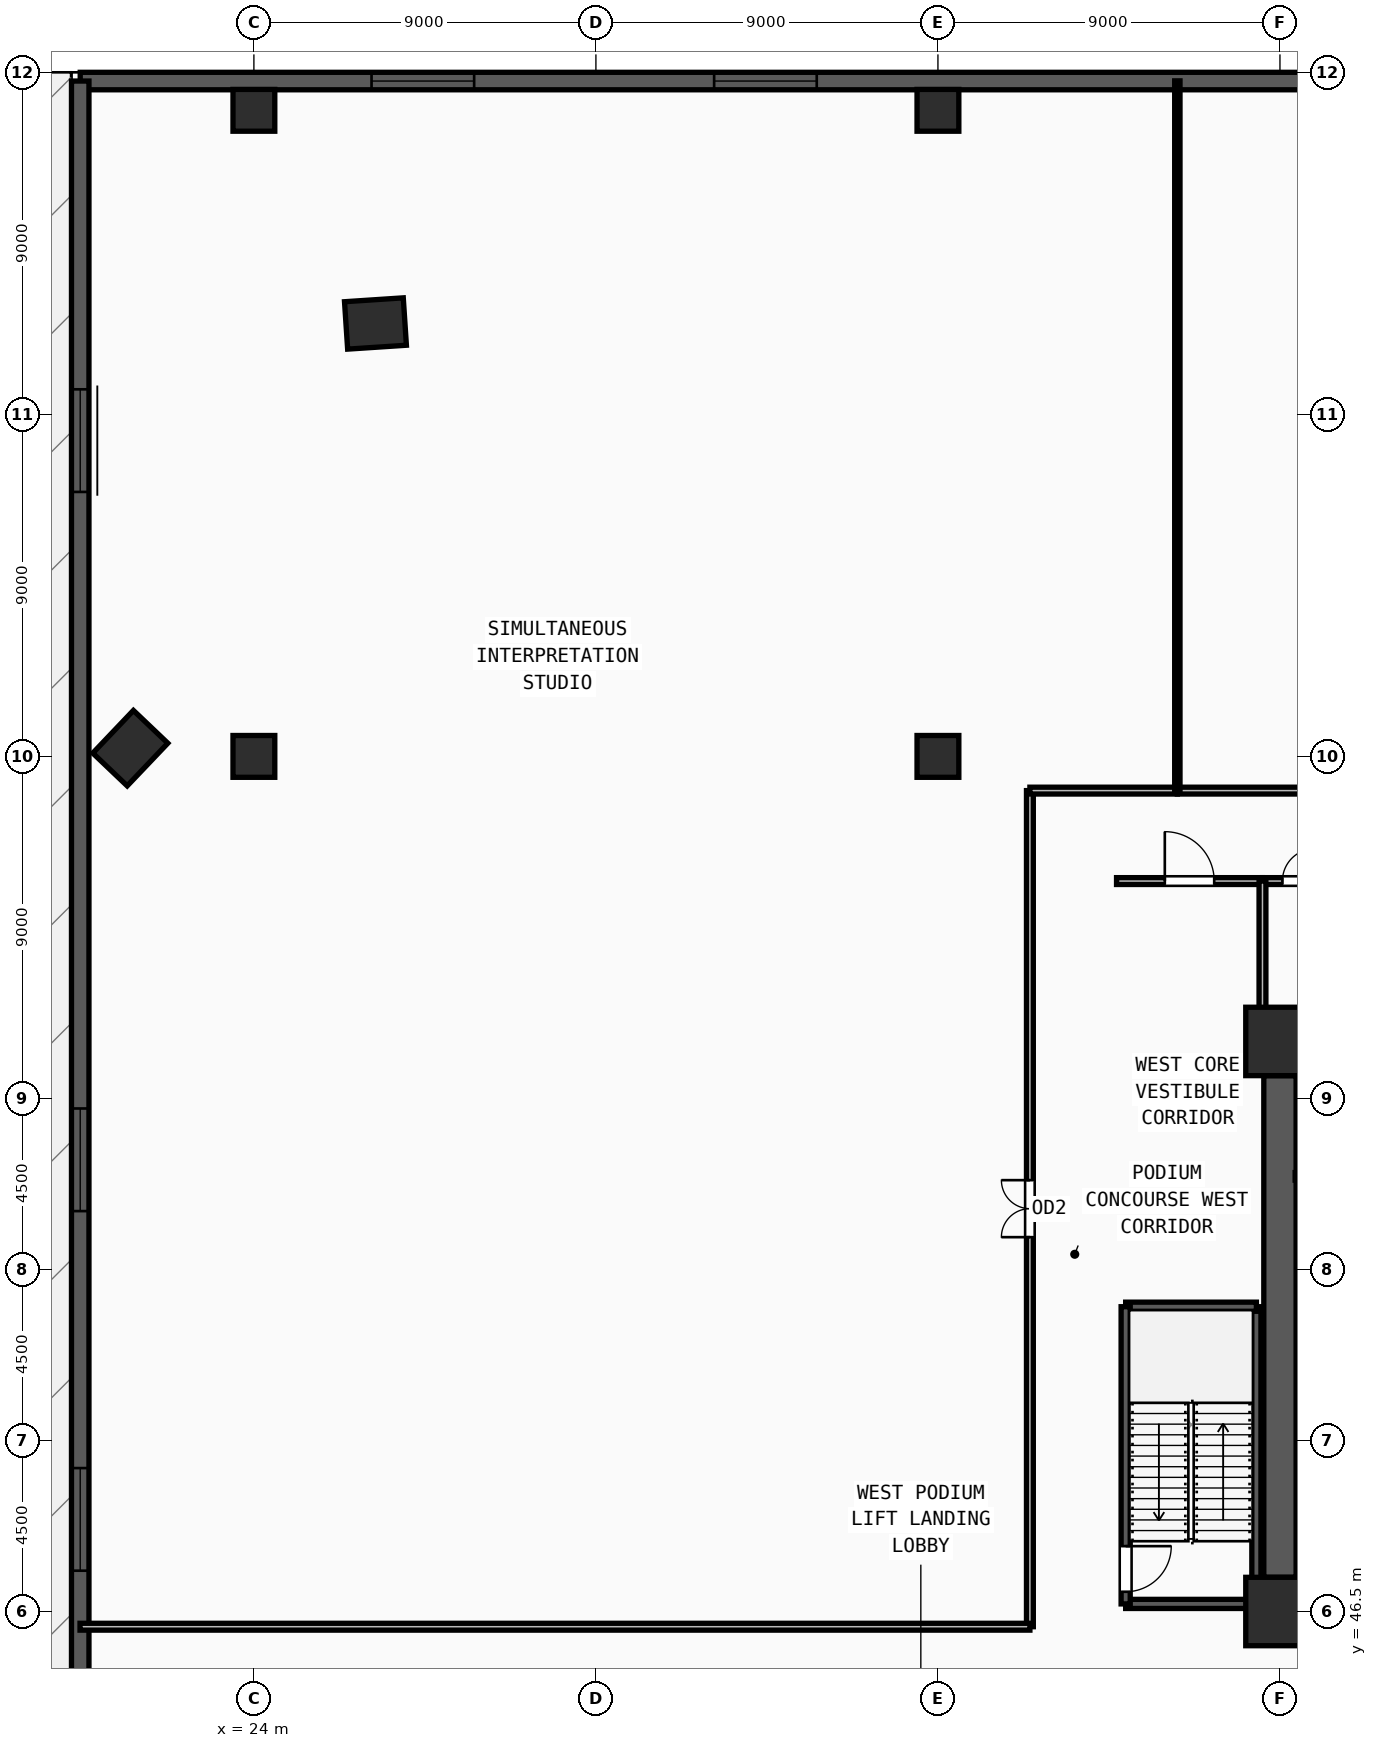
"""IFC4 building model, lengths in metres.
Left out: names, types, materials, properties, quantities, classifications, styles, units other than length and angle.
Written with IfcOpenShell. Run it as: python <this file> out.ifc"""

import sys

from ifc_helpers import new_model, si_unit, direction, frame, frame_2d, origin, origin_2d, place, context, subcontext, project, spatial, rectangle, extrude, source, transform, mapped, element, fill, save


model = new_model("IFC4")
c1 = context("Model", 3, precision=1e-05, world=origin(), true_north=direction((0.0, 1.0)))
c2 = subcontext(c1, "Body", "Model", "MODEL_VIEW")
j1 = project(units=[si_unit("LENGTHUNIT", "METRE"), si_unit("PLANEANGLEUNIT", "RADIAN")], contexts=[c1])
p1 = place(None, origin())
s1 = spatial("IfcSite", under=j1, at=p1, CompositionType="ELEMENT")
p2 = place(p1, origin())
s2 = spatial("IfcBuilding", under=s1, at=p2, CompositionType="ELEMENT")
p3 = place(p2, frame((0.0, 0.0, 9.9)))
s3 = spatial("IfcBuildingStorey", under=s2, at=p3, CompositionType="ELEMENT", Elevation=9.9)
m1 = source(origin(), c2, "Body", "SweptSolid", [
    extrude(rectangle(XDim=1.8, YDim=1.8, at=origin_2d()), origin(), (0.0, 0.0, 1.0), 4.5),
])
for number, where, z_axis, x_axis in (
    (1, (51.0, 46.5, 0.0), (0.0, 0.0, 1.0), (1.0, 0.0, 0.0)),
    (2, (51.0, 61.5, 0.0), (0.0, 0.0, 1.0), (1.0, 0.0, 0.0)),
):
    element("IfcColumn", number, at=place(p3, frame(where, z_axis=z_axis, x_axis=x_axis)), inside=s3, PredefinedType="COLUMN", context=c2, shape_type="MappedRepresentation", body=[
        mapped(m1, transform((0.0, 0.0, 0.0), x_axis=(1.0, 0.0, 0.0), y_axis=(0.0, 1.0, 0.0), z_axis=(0.0, 0.0, 1.0), scale=1.0)),
    ])
m2 = source(origin(), c2, "Body", "SweptSolid", [
    extrude(rectangle(XDim=1.55, YDim=1.25, at=origin_2d()), origin(), (0.0, 0.0, 1.0), 4.5),
])
for number, where, z_axis, x_axis in (
    (3, (20.748, 69.217, 0.0), (0.0, 0.0, 1.0), (0.689, 0.724, 0.0)),
    (4, (27.199, 80.391, 0.0), (0.0, 0.0, 1.0), (0.998, 0.066, 0.0)),
):
    element("IfcColumn", number, at=place(p3, frame(where, z_axis=z_axis, x_axis=x_axis)), inside=s3, PredefinedType="COLUMN", context=c2, shape_type="MappedRepresentation", body=[
        mapped(m2, transform((0.0, 0.0, 0.0), x_axis=(1.0, 0.0, 0.0), y_axis=(0.0, 1.0, 0.0), z_axis=(0.0, 0.0, 1.0), scale=1.0)),
    ])
m3 = source(origin(), c2, "Body", "SweptSolid", [
    extrude(rectangle(XDim=1.1, YDim=1.1, at=origin_2d()), origin(), (0.0, 0.0, 1.0), 4.5),
])
for number, where, z_axis, x_axis in (
    (5, (24.0, 69.0, 0.0), (0.0, 0.0, 1.0), (1.0, 0.0, 0.0)),
    (6, (42.0, 69.0, 0.0), (0.0, 0.0, 1.0), (1.0, 0.0, 0.0)),
    (7, (24.0, 86.0, 0.0), (0.0, 0.0, 1.0), (1.0, 0.0, 0.0)),
    (8, (42.0, 86.0, 0.0), (0.0, 0.0, 1.0), (1.0, 0.0, 0.0)),
):
    element("IfcColumn", number, at=place(p3, frame(where, z_axis=z_axis, x_axis=x_axis)), inside=s3, PredefinedType="COLUMN", context=c2, shape_type="MappedRepresentation", body=[
        mapped(m3, transform((0.0, 0.0, 0.0), x_axis=(1.0, 0.0, 0.0), y_axis=(0.0, 1.0, 0.0), z_axis=(0.0, 0.0, 1.0), scale=1.0)),
    ])
p4 = place(p3, frame((100.57, 86.77, 0.0), z_axis=(0.0, 0.0, 1.0), x_axis=(-1.0, 0.0, 0.0)))
e9 = element("IfcWall", 9, at=p4, inside=s3, PredefinedType="SOLIDWALL", context=c2, shape_type="SweptSolid", body=[
    extrude(rectangle(XDim=81.14, YDim=0.46, at=frame_2d((40.57, 0.0))), origin(), (0.0, 0.0, 1.0), 4.25),
])
m4 = source(origin(), c2, "Body", "SweptSolid", [
    extrude(rectangle(XDim=2.7, YDim=2.35, at=frame_2d((1.35, 1.175))), frame((0.0, 0.24, 0.0), z_axis=(0.0, -1.0, 0.0), x_axis=(1.0, 0.0, 0.0)), (0.0, 0.0, 1.0), 0.48),
])
p5 = place(p4, frame((7.666, 0.0, 0.55)))
e10 = element("IfcOpeningElement", 10, at=p5, cuts=e9, PredefinedType="OPENING", context=c2, shape_type="MappedRepresentation", body=[
    mapped(m4, transform((0.0, 0.0, 0.0), x_axis=(1.0, 0.0, 0.0), y_axis=(0.0, 1.0, 0.0), z_axis=(0.0, 0.0, 1.0), scale=1.0)),
])
p6 = place(p4, frame((16.681, 0.0, 0.55)))
e11 = element("IfcOpeningElement", 11, at=p6, cuts=e9, PredefinedType="OPENING", context=c2, shape_type="MappedRepresentation", body=[
    mapped(m4, transform((0.0, 0.0, 0.0), x_axis=(1.0, 0.0, 0.0), y_axis=(0.0, 1.0, 0.0), z_axis=(0.0, 0.0, 1.0), scale=1.0)),
])
p7 = place(p4, frame((34.712, 0.0, 0.55)))
e12 = element("IfcOpeningElement", 12, at=p7, cuts=e9, PredefinedType="OPENING", context=c2, shape_type="MappedRepresentation", body=[
    mapped(m4, transform((0.0, 0.0, 0.0), x_axis=(1.0, 0.0, 0.0), y_axis=(0.0, 1.0, 0.0), z_axis=(0.0, 0.0, 1.0), scale=1.0)),
])
p8 = place(p4, frame((43.728, 0.0, 0.55)))
e13 = element("IfcOpeningElement", 13, at=p8, cuts=e9, PredefinedType="OPENING", context=c2, shape_type="MappedRepresentation", body=[
    mapped(m4, transform((0.0, 0.0, 0.0), x_axis=(1.0, 0.0, 0.0), y_axis=(0.0, 1.0, 0.0), z_axis=(0.0, 0.0, 1.0), scale=1.0)),
])
p9 = place(p4, frame((61.759, 0.0, 0.55)))
e14 = element("IfcOpeningElement", 14, at=p9, cuts=e9, PredefinedType="OPENING", context=c2, shape_type="MappedRepresentation", body=[
    mapped(m4, transform((0.0, 0.0, 0.0), x_axis=(1.0, 0.0, 0.0), y_axis=(0.0, 1.0, 0.0), z_axis=(0.0, 0.0, 1.0), scale=1.0)),
])
p10 = place(p4, frame((70.774, 0.0, 0.55)))
e15 = element("IfcOpeningElement", 15, at=p10, cuts=e9, PredefinedType="OPENING", context=c2, shape_type="MappedRepresentation", body=[
    mapped(m4, transform((0.0, 0.0, 0.0), x_axis=(1.0, 0.0, 0.0), y_axis=(0.0, 1.0, 0.0), z_axis=(0.0, 0.0, 1.0), scale=1.0)),
])
p11 = place(p3, frame((19.43, 86.77, 0.0), z_axis=(0.0, 0.0, 1.0), x_axis=(0.0, -1.0, 0.0)))
e16 = element("IfcWall", 16, at=p11, inside=s3, PredefinedType="SOLIDWALL", context=c2, shape_type="SweptSolid", body=[
    extrude(rectangle(XDim=66.23, YDim=0.46, at=frame_2d((33.115, 0.0))), origin(), (0.0, 0.0, 1.0), 4.25),
])
p12 = place(p11, frame((8.111, 0.0, 0.55)))
e17 = element("IfcOpeningElement", 17, at=p12, cuts=e16, PredefinedType="OPENING", context=c2, shape_type="MappedRepresentation", body=[
    mapped(m4, transform((0.0, 0.0, 0.0), x_axis=(1.0, 0.0, 0.0), y_axis=(0.0, 1.0, 0.0), z_axis=(0.0, 0.0, 1.0), scale=1.0)),
])
p13 = place(p11, frame((27.034, 0.0, 0.55)))
e18 = element("IfcOpeningElement", 18, at=p13, cuts=e16, PredefinedType="OPENING", context=c2, shape_type="MappedRepresentation", body=[
    mapped(m4, transform((0.0, 0.0, 0.0), x_axis=(1.0, 0.0, 0.0), y_axis=(0.0, 1.0, 0.0), z_axis=(0.0, 0.0, 1.0), scale=1.0)),
])
p14 = place(p11, frame((36.496, 0.0, 0.55)))
e19 = element("IfcOpeningElement", 19, at=p14, cuts=e16, PredefinedType="OPENING", context=c2, shape_type="MappedRepresentation", body=[
    mapped(m4, transform((0.0, 0.0, 0.0), x_axis=(1.0, 0.0, 0.0), y_axis=(0.0, 1.0, 0.0), z_axis=(0.0, 0.0, 1.0), scale=1.0)),
])
p15 = place(p11, frame((45.957, 0.0, 0.55)))
e20 = element("IfcOpeningElement", 20, at=p15, cuts=e16, PredefinedType="OPENING", context=c2, shape_type="MappedRepresentation", body=[
    mapped(m4, transform((0.0, 0.0, 0.0), x_axis=(1.0, 0.0, 0.0), y_axis=(0.0, 1.0, 0.0), z_axis=(0.0, 0.0, 1.0), scale=1.0)),
])
p16 = place(p11, frame((55.419, 0.0, 0.55)))
e21 = element("IfcOpeningElement", 21, at=p16, cuts=e16, PredefinedType="OPENING", context=c2, shape_type="MappedRepresentation", body=[
    mapped(m4, transform((0.0, 0.0, 0.0), x_axis=(1.0, 0.0, 0.0), y_axis=(0.0, 1.0, 0.0), z_axis=(0.0, 0.0, 1.0), scale=1.0)),
])
p17 = place(p3, frame((51.0, 47.4, 0.0), z_axis=(0.0, 0.0, 1.0), x_axis=(0.0, 1.0, 0.0)))
e22 = element("IfcWall", 22, at=p17, inside=s3, PredefinedType="SHEAR", context=c2, shape_type="SweptSolid", body=[
    extrude(rectangle(XDim=13.2, YDim=0.85, at=frame_2d((6.6, 0.0))), origin(), (0.0, 0.0, 1.0), 4.25),
])
p18 = place(p3, frame((46.94, 46.7, 0.0), z_axis=(0.0, 0.0, 1.0), x_axis=(1.0, 0.0, 0.0)))
e23 = element("IfcWall", 23, at=p18, inside=s3, PredefinedType="SOLIDWALL", context=c2, shape_type="SweptSolid", body=[
    extrude(rectangle(XDim=3.44, YDim=0.24, at=frame_2d((1.72, 0.0))), origin(), (0.0, 0.0, 1.0), 4.25),
])
p19 = place(p3, frame((50.38, 46.7, 0.0), z_axis=(0.0, 0.0, 1.0), x_axis=(0.0, 1.0, 0.0)))
e24 = element("IfcWall", 24, at=p19, inside=s3, PredefinedType="SOLIDWALL", context=c2, shape_type="SweptSolid", body=[
    extrude(rectangle(XDim=7.82, YDim=0.24, at=frame_2d((3.91, 0.0))), origin(), (0.0, 0.0, 1.0), 4.25),
])
p20 = place(p3, frame((50.38, 54.52, 0.0), z_axis=(0.0, 0.0, 1.0), x_axis=(-1.0, 0.0, 0.0)))
e25 = element("IfcWall", 25, at=p20, inside=s3, PredefinedType="SOLIDWALL", context=c2, shape_type="SweptSolid", body=[
    extrude(rectangle(XDim=3.44, YDim=0.24, at=frame_2d((1.72, 0.0))), origin(), (0.0, 0.0, 1.0), 4.25),
])
p21 = place(p3, frame((46.94, 54.52, 0.0), z_axis=(0.0, 0.0, 1.0), x_axis=(0.0, -1.0, 0.0)))
e26 = element("IfcWall", 26, at=p21, inside=s3, PredefinedType="SOLIDWALL", context=c2, shape_type="SweptSolid", body=[
    extrude(rectangle(XDim=7.82, YDim=0.24, at=frame_2d((3.91, 0.0))), origin(), (0.0, 0.0, 1.0), 4.25),
])
m5 = source(origin(), c2, "Body", "SweptSolid", [
    extrude(rectangle(XDim=1.2, YDim=2.2, at=frame_2d((0.6, 1.1))), frame((0.0, 0.13, 0.0), z_axis=(0.0, -1.0, 0.0), x_axis=(1.0, 0.0, 0.0)), (0.0, 0.0, 1.0), 0.26),
])
p22 = place(p21, frame((6.3, 0.0, 0.0)))
e27 = element("IfcOpeningElement", 27, at=p22, cuts=e26, PredefinedType="OPENING", context=c2, shape_type="MappedRepresentation", body=[
    mapped(m5, transform((0.0, 0.0, 0.0), x_axis=(1.0, 0.0, 0.0), y_axis=(0.0, 1.0, 0.0), z_axis=(0.0, 0.0, 1.0), scale=1.0)),
])
for number, where, z_axis, x_axis in (
    (28, (51.4, 57.95, 0.0), (0.0, 0.0, 1.0), (1.0, 0.0, 0.0)),
    (29, (53.8, 60.88, 0.0), (0.0, 0.0, 1.0), (-1.0, 0.0, 0.0)),
):
    element("IfcWall", number, at=place(p3, frame(where, z_axis=z_axis, x_axis=x_axis)), inside=s3, PredefinedType="SOLIDWALL", context=c2, shape_type="SweptSolid", body=[
        extrude(rectangle(XDim=2.4, YDim=0.2, at=frame_2d((1.2, 0.0))), origin(), (0.0, 0.0, 1.0), 4.25),
    ])
p23 = place(p3, frame((50.54, 65.72, 0.0), z_axis=(0.0, 0.0, 1.0), x_axis=(1.0, 0.0, 0.0)))
e30 = element("IfcWall", 30, at=p23, inside=s3, PredefinedType="PARTITIONING", context=c2, shape_type="SweptSolid", body=[
    extrude(rectangle(XDim=1.9, YDim=0.18, at=frame_2d((0.95, 0.0))), origin(), (0.0, 0.0, 1.0), 4.25),
])
m6 = source(origin(), c2, "Body", "SweptSolid", [
    extrude(rectangle(XDim=0.85, YDim=2.1, at=frame_2d((0.425, 1.05))), frame((0.0, 0.1, 0.0), z_axis=(0.0, -1.0, 0.0), x_axis=(1.0, 0.0, 0.0)), (0.0, 0.0, 1.0), 0.2),
])
p24 = place(p23, frame((0.525, 0.0, 0.0)))
e31 = element("IfcOpeningElement", 31, at=p24, cuts=e30, PredefinedType="OPENING", context=c2, shape_type="MappedRepresentation", body=[
    mapped(m6, transform((0.0, 0.0, 0.0), x_axis=(1.0, 0.0, 0.0), y_axis=(0.0, 1.0, 0.0), z_axis=(0.0, 0.0, 1.0), scale=1.0)),
])
p25 = place(p3, frame((46.7, 65.72, 0.0), z_axis=(0.0, 0.0, 1.0), x_axis=(1.0, 0.0, 0.0)))
e32 = element("IfcWall", 32, at=p25, inside=s3, PredefinedType="PARTITIONING", context=c2, shape_type="SweptSolid", body=[
    extrude(rectangle(XDim=3.84, YDim=0.18, at=frame_2d((1.92, 0.0))), origin(), (0.0, 0.0, 1.0), 4.25),
])
m7 = source(origin(), c2, "Body", "SweptSolid", [
    extrude(rectangle(XDim=1.3, YDim=2.2, at=frame_2d((0.65, 1.1))), frame((0.0, 0.1, 0.0), z_axis=(0.0, -1.0, 0.0), x_axis=(1.0, 0.0, 0.0)), (0.0, 0.0, 1.0), 0.2),
])
p26 = place(p25, frame((1.27, 0.0, 0.0)))
e33 = element("IfcOpeningElement", 33, at=p26, cuts=e32, PredefinedType="OPENING", context=c2, shape_type="MappedRepresentation", body=[
    mapped(m7, transform((0.0, 0.0, 0.0), x_axis=(1.0, 0.0, 0.0), y_axis=(0.0, 1.0, 0.0), z_axis=(0.0, 0.0, 1.0), scale=1.0)),
])
p27 = place(p3, frame((44.42, 46.1, 0.0), z_axis=(0.0, 0.0, 1.0), x_axis=(0.0, 1.0, 0.0)))
e34 = element("IfcWall", 34, at=p27, inside=s3, PredefinedType="PARTITIONING", context=c2, shape_type="SweptSolid", body=[
    extrude(rectangle(XDim=22.0, YDim=0.18, at=frame_2d((11.0, 0.0))), origin(), (0.0, 0.0, 1.0), 4.25),
])
m8 = source(origin(), c2, "Body", "SweptSolid", [
    extrude(rectangle(XDim=1.5, YDim=2.2, at=frame_2d((0.75, 1.1))), frame((0.0, 0.1, 0.0), z_axis=(0.0, -1.0, 0.0), x_axis=(1.0, 0.0, 0.0)), (0.0, 0.0, 1.0), 0.2),
])
p28 = place(p27, frame((10.25, 0.0, 0.0)))
e35 = element("IfcOpeningElement", 35, at=p28, cuts=e34, PredefinedType="OPENING", context=c2, shape_type="MappedRepresentation", body=[
    mapped(m8, transform((0.0, 0.0, 0.0), x_axis=(1.0, 0.0, 0.0), y_axis=(0.0, 1.0, 0.0), z_axis=(0.0, 0.0, 1.0), scale=1.0)),
])
p29 = place(p3, frame((48.3, 68.1, 0.0), z_axis=(0.0, 0.0, 1.0), x_axis=(1.0, 0.0, 0.0)))
e36 = element("IfcWall", 36, at=p29, inside=s3, PredefinedType="PARTITIONING", context=c2, shape_type="SweptSolid", body=[
    extrude(rectangle(XDim=23.4, YDim=0.18, at=frame_2d((11.7, 0.0))), origin(), (0.0, 0.0, 1.0), 4.25),
])
m9 = source(origin(), c2, "Body", "SweptSolid", [
    extrude(rectangle(XDim=1.0, YDim=2.2, at=frame_2d((0.5, 1.1))), frame((0.0, 0.1, 0.0), z_axis=(0.0, -1.0, 0.0), x_axis=(1.0, 0.0, 0.0)), (0.0, 0.0, 1.0), 0.2),
])
p30 = place(p29, frame((11.2, 0.0, 0.0)))
e37 = element("IfcOpeningElement", 37, at=p30, cuts=e36, PredefinedType="OPENING", context=c2, shape_type="MappedRepresentation", body=[
    mapped(m9, transform((0.0, 0.0, 0.0), x_axis=(1.0, 0.0, 0.0), y_axis=(0.0, 1.0, 0.0), z_axis=(0.0, 0.0, 1.0), scale=1.0)),
])
p31 = place(p3, frame((19.425, 46.1, 0.0), z_axis=(0.0, 0.0, 1.0), x_axis=(1.0, 0.0, 0.0)))
e38 = element("IfcWall", 38, at=p31, inside=s3, PredefinedType="PARTITIONING", context=c2, shape_type="SweptSolid", body=[
    extrude(rectangle(XDim=24.995, YDim=0.18, at=frame_2d((12.498, 0.0))), origin(), (0.0, 0.0, 1.0), 4.25),
])
p32 = place(p3, frame((44.42, 68.1, 0.0), z_axis=(0.0, 0.0, 1.0), x_axis=(1.0, 0.0, 0.0)))
e39 = element("IfcWall", 39, at=p32, inside=s3, PredefinedType="PARTITIONING", context=c2, shape_type="SweptSolid", body=[
    extrude(rectangle(XDim=3.88, YDim=0.18, at=frame_2d((1.94, 0.0))), origin(), (0.0, 0.0, 1.0), 4.25),
])
p33 = place(p3, frame((48.3, 68.1, 0.0), z_axis=(0.0, 0.0, 1.0), x_axis=(0.0, 1.0, 0.0)))
e40 = element("IfcWall", 40, at=p33, inside=s3, PredefinedType="PARTITIONING", context=c2, shape_type="SweptSolid", body=[
    extrude(rectangle(XDim=18.675, YDim=0.14, at=frame_2d((9.337, 0.0))), origin(), (0.0, 0.0, 1.0), 4.25),
])
p34 = place(p3, frame((50.54, 61.95, 0.0), z_axis=(0.0, 0.0, 1.0), x_axis=(0.0, 1.0, 0.0)))
e41 = element("IfcWall", 41, at=p34, inside=s3, PredefinedType="PARTITIONING", context=c2, shape_type="SweptSolid", body=[
    extrude(rectangle(XDim=3.77, YDim=0.18, at=frame_2d((1.885, 0.0))), origin(), (0.0, 0.0, 1.0), 4.25),
])
m10 = source(origin(), c2, "Body", "SweptSolid", [
    extrude(rectangle(XDim=2.7, YDim=2.35, at=frame_2d((1.35, 1.175))), frame((0.0, 0.03, 0.0), z_axis=(0.0, -1.0, 0.0), x_axis=(1.0, 0.0, 0.0)), (0.0, 0.0, 1.0), 0.06),
])
p35 = place(p9, origin())
e42 = element("IfcWindow", 42, at=p35, inside=s3, PartitioningType="TRIPLE_PANEL_VERTICAL", PredefinedType="WINDOW", context=c2, shape_type="MappedRepresentation", body=[
    mapped(m10, transform((0.0, 0.0, 0.0), x_axis=(1.0, 0.0, 0.0), y_axis=(0.0, 1.0, 0.0), z_axis=(0.0, 0.0, 1.0), scale=1.0)),
])
fill(e14, e42)
p36 = place(p10, origin())
e43 = element("IfcWindow", 43, at=p36, inside=s3, PartitioningType="TRIPLE_PANEL_VERTICAL", PredefinedType="WINDOW", context=c2, shape_type="MappedRepresentation", body=[
    mapped(m10, transform((0.0, 0.0, 0.0), x_axis=(1.0, 0.0, 0.0), y_axis=(0.0, 1.0, 0.0), z_axis=(0.0, 0.0, 1.0), scale=1.0)),
])
fill(e15, e43)
p37 = place(p12, origin())
e44 = element("IfcWindow", 44, at=p37, inside=s3, PartitioningType="TRIPLE_PANEL_VERTICAL", PredefinedType="WINDOW", context=c2, shape_type="MappedRepresentation", body=[
    mapped(m10, transform((0.0, 0.0, 0.0), x_axis=(1.0, 0.0, 0.0), y_axis=(0.0, 1.0, 0.0), z_axis=(0.0, 0.0, 1.0), scale=1.0)),
])
fill(e17, e44)
p38 = place(p13, origin())
e45 = element("IfcWindow", 45, at=p38, inside=s3, PartitioningType="TRIPLE_PANEL_VERTICAL", PredefinedType="WINDOW", context=c2, shape_type="MappedRepresentation", body=[
    mapped(m10, transform((0.0, 0.0, 0.0), x_axis=(1.0, 0.0, 0.0), y_axis=(0.0, 1.0, 0.0), z_axis=(0.0, 0.0, 1.0), scale=1.0)),
])
fill(e18, e45)
p39 = place(p14, origin())
e46 = element("IfcWindow", 46, at=p39, inside=s3, PartitioningType="TRIPLE_PANEL_VERTICAL", PredefinedType="WINDOW", context=c2, shape_type="MappedRepresentation", body=[
    mapped(m10, transform((0.0, 0.0, 0.0), x_axis=(1.0, 0.0, 0.0), y_axis=(0.0, 1.0, 0.0), z_axis=(0.0, 0.0, 1.0), scale=1.0)),
])
fill(e19, e46)
m11 = source(origin(), c2, "Body", "SweptSolid", [
    extrude(rectangle(XDim=1.2, YDim=2.2, at=frame_2d((0.6, 1.1))), frame((0.0, 0.025, 0.0), z_axis=(0.0, -1.0, 0.0), x_axis=(1.0, 0.0, 0.0)), (0.0, 0.0, 1.0), 0.05),
])
p40 = place(p22, origin())
e47 = element("IfcDoor", 47, at=p40, inside=s3, OperationType="SINGLE_SWING_LEFT", PredefinedType="DOOR", context=c2, shape_type="MappedRepresentation", body=[
    mapped(m11, transform((0.0, 0.0, 0.0), x_axis=(1.0, 0.0, 0.0), y_axis=(0.0, 1.0, 0.0), z_axis=(0.0, 0.0, 1.0), scale=1.0)),
])
fill(e27, e47)
m12 = source(origin(), c2, "Body", "SweptSolid", [
    extrude(rectangle(XDim=0.85, YDim=2.1, at=frame_2d((0.425, 1.05))), frame((0.0, 0.025, 0.0), z_axis=(0.0, -1.0, 0.0), x_axis=(1.0, 0.0, 0.0)), (0.0, 0.0, 1.0), 0.05),
])
p41 = place(p24, origin())
e48 = element("IfcDoor", 48, at=p41, inside=s3, OperationType="SINGLE_SWING_RIGHT", PredefinedType="DOOR", context=c2, shape_type="MappedRepresentation", body=[
    mapped(m12, transform((0.0, 0.0, 0.0), x_axis=(1.0, 0.0, 0.0), y_axis=(0.0, 1.0, 0.0), z_axis=(0.0, 0.0, 1.0), scale=1.0)),
])
fill(e31, e48)
m13 = source(origin(), c2, "Body", "SweptSolid", [
    extrude(rectangle(XDim=1.3, YDim=2.2, at=frame_2d((0.65, 1.1))), frame((0.0, 0.025, 0.0), z_axis=(0.0, -1.0, 0.0), x_axis=(1.0, 0.0, 0.0)), (0.0, 0.0, 1.0), 0.05),
])
p42 = place(p26, origin())
e49 = element("IfcDoor", 49, at=p42, inside=s3, OperationType="SINGLE_SWING_LEFT", PredefinedType="DOOR", context=c2, shape_type="MappedRepresentation", body=[
    mapped(m13, transform((0.0, 0.0, 0.0), x_axis=(1.0, 0.0, 0.0), y_axis=(0.0, 1.0, 0.0), z_axis=(0.0, 0.0, 1.0), scale=1.0)),
])
fill(e33, e49)
m14 = source(origin(), c2, "Body", "SweptSolid", [
    extrude(rectangle(XDim=1.5, YDim=2.2, at=frame_2d((0.75, 1.1))), frame((0.0, 0.025, 0.0), z_axis=(0.0, -1.0, 0.0), x_axis=(1.0, 0.0, 0.0)), (0.0, 0.0, 1.0), 0.05),
])
p43 = place(p28, origin())
e50 = element("IfcDoor", 50, at=p43, inside=s3, OperationType="DOUBLE_DOOR_SINGLE_SWING", PredefinedType="DOOR", context=c2, shape_type="MappedRepresentation", body=[
    mapped(m14, transform((0.0, 0.0, 0.0), x_axis=(1.0, 0.0, 0.0), y_axis=(0.0, 1.0, 0.0), z_axis=(0.0, 0.0, 1.0), scale=1.0)),
])
fill(e35, e50)
save(model, sys.argv[1])
